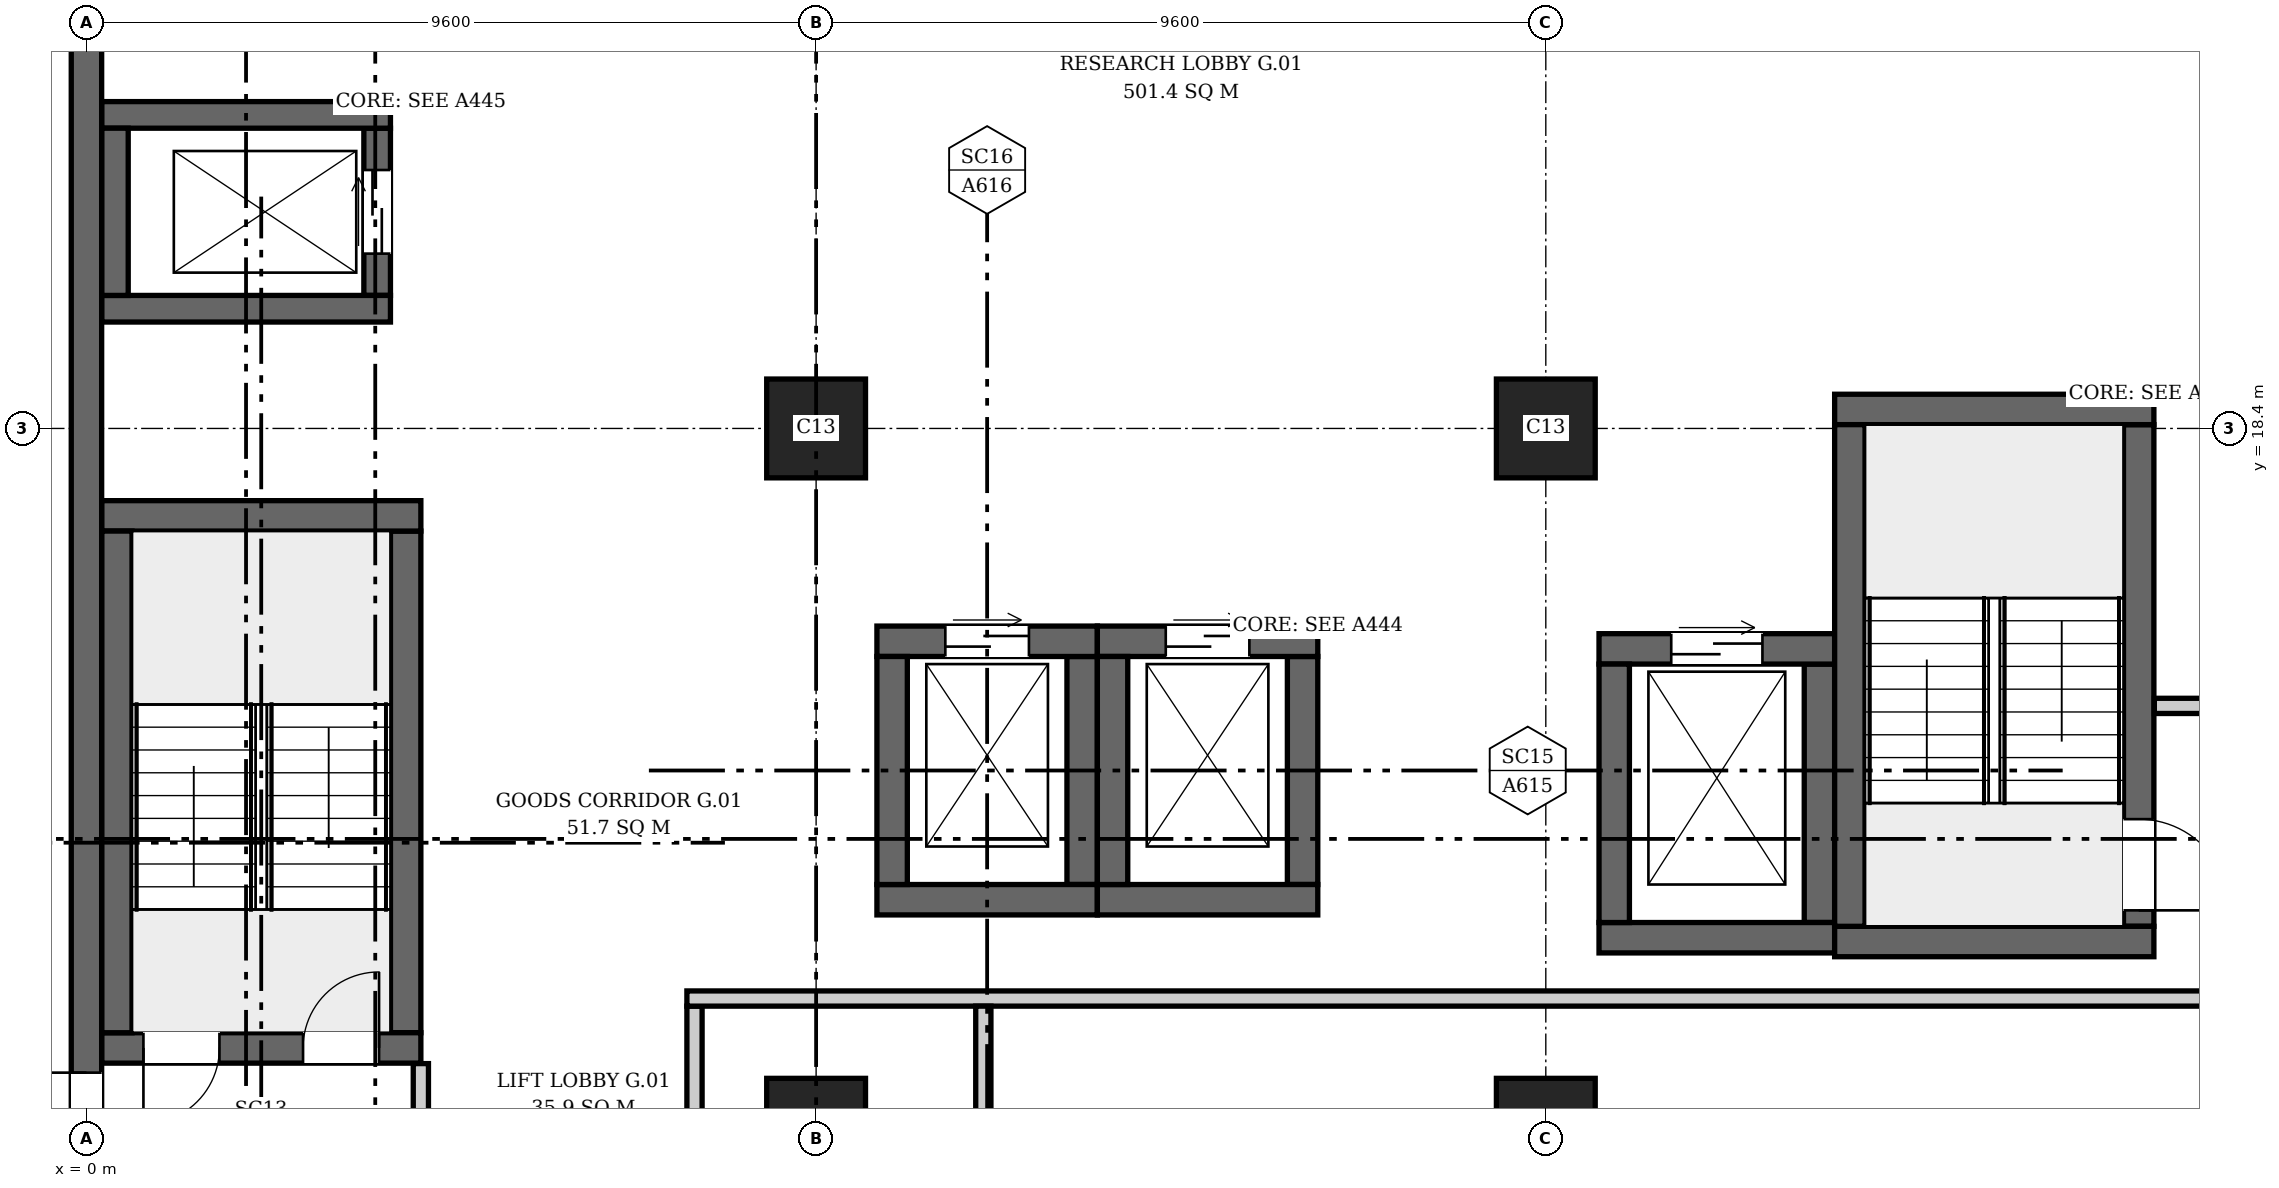
"""IFC4 building model, lengths in metres.
Left out: names, types, materials, properties, quantities, classifications, styles, units other than length and angle.
Written with IfcOpenShell. Run it as: python <this file> out.ifc"""

import sys

from ifc_helpers import new_model, si_unit, direction, frame, frame_2d, origin, origin_2d, place, context, subcontext, project, spatial, rectangle, extrude, element, fill, save


model = new_model("IFC4")
c1 = context("Model", 3, precision=1e-05, world=origin(), true_north=direction((0.0, 1.0)))
c2 = subcontext(c1, "Body", "Model", "MODEL_VIEW")
j1 = project(units=[si_unit("LENGTHUNIT", "METRE"), si_unit("PLANEANGLEUNIT", "RADIAN")], contexts=[c1])
p1 = place(None, origin())
s1 = spatial("IfcSite", under=j1, at=p1, CompositionType="ELEMENT")
p2 = place(p1, origin())
s2 = spatial("IfcBuilding", under=s1, at=p2, CompositionType="ELEMENT")
p3 = place(p2, origin())
s3 = spatial("IfcBuildingStorey", under=s2, at=p3, CompositionType="ELEMENT", Elevation=0.0)
p4 = place(p3, frame((0.0, -0.2, 0.0), z_axis=(0.0, 0.0, 1.0), x_axis=(0.0, 1.0, 0.0)))
e1 = element("IfcWall", 1, at=p4, inside=s3, PredefinedType="SHEAR", context=c2, shape_type="SweptSolid", body=[
    extrude(rectangle(XDim=46.88, YDim=0.4, at=frame_2d((23.44, 0.0))), origin(), (0.0, 0.0, 1.0), 6.5),
])
p5 = place(p4, frame((7.125, 0.0, 0.0)))
e2 = element("IfcOpeningElement", 2, at=p5, cuts=e1, PredefinedType="OPENING", context=c2, shape_type="SweptSolid", body=[
    extrude(rectangle(XDim=3.0, YDim=2.4, at=frame_2d((1.5, 1.2))), frame((0.0, 0.21, 0.0), z_axis=(0.0, -1.0, 0.0), x_axis=(1.0, 0.0, 0.0)), (0.0, 0.0, 1.0), 0.42),
])
p6 = place(p4, frame((38.2, 0.0, 0.0)))
e3 = element("IfcOpeningElement", 3, at=p6, cuts=e1, PredefinedType="OPENING", context=c2, shape_type="SweptSolid", body=[
    extrude(rectangle(XDim=3.0, YDim=2.4, at=frame_2d((1.5, 1.2))), frame((0.0, 0.21, 0.0), z_axis=(0.0, -1.0, 0.0), x_axis=(1.0, 0.0, 0.0)), (0.0, 0.0, 1.0), 0.42),
])
p7 = place(p3, frame((0.2, 10.25, 0.0), z_axis=(0.0, 0.0, 1.0), x_axis=(1.0, 0.0, 0.0)))
e4 = element("IfcWall", 4, at=p7, inside=s3, PredefinedType="SHEAR", context=c2, shape_type="SweptSolid", body=[
    extrude(rectangle(XDim=4.2, YDim=0.4, at=frame_2d((2.1, 0.0))), origin(), (0.0, 0.0, 1.0), 6.5),
])
p8 = place(p7, frame((0.55, 0.0, 0.0)))
e5 = element("IfcOpeningElement", 5, at=p8, cuts=e4, PredefinedType="OPENING", context=c2, shape_type="SweptSolid", body=[
    extrude(rectangle(XDim=1.0, YDim=2.1, at=frame_2d((0.5, 1.05))), frame((0.0, 0.21, 0.0), z_axis=(0.0, -1.0, 0.0), x_axis=(1.0, 0.0, 0.0)), (0.0, 0.0, 1.0), 0.42),
])
p9 = place(p7, frame((2.65, 0.0, 0.0)))
e6 = element("IfcOpeningElement", 6, at=p9, cuts=e4, PredefinedType="OPENING", context=c2, shape_type="SweptSolid", body=[
    extrude(rectangle(XDim=1.0, YDim=2.1, at=frame_2d((0.5, 1.05))), frame((0.0, 0.21, 0.0), z_axis=(0.0, -1.0, 0.0), x_axis=(1.0, 0.0, 0.0)), (0.0, 0.0, 1.0), 0.42),
])
p10 = place(p3, frame((0.2, 17.25, 0.0), z_axis=(0.0, 0.0, 1.0), x_axis=(1.0, 0.0, 0.0)))
e7 = element("IfcWall", 7, at=p10, inside=s3, PredefinedType="SHEAR", context=c2, shape_type="SweptSolid", body=[
    extrude(rectangle(XDim=4.2, YDim=0.4, at=frame_2d((2.1, 0.0))), origin(), (0.0, 0.0, 1.0), 6.5),
])
for number, where, z_axis, x_axis in (
    (8, (0.4, 10.45, 0.0), (0.0, 0.0, 1.0), (0.0, 1.0, 0.0)),
    (9, (4.2, 10.45, 0.0), (0.0, 0.0, 1.0), (0.0, 1.0, 0.0)),
):
    element("IfcWall", number, at=place(p3, frame(where, z_axis=z_axis, x_axis=x_axis)), inside=s3, PredefinedType="SHEAR", context=c2, shape_type="SweptSolid", body=[
        extrude(rectangle(XDim=6.6, YDim=0.4, at=frame_2d((3.3, 0.0))), origin(), (0.0, 0.0, 1.0), 6.5),
    ])
for number, where, z_axis, x_axis in (
    (10, (23.0, 11.65, 0.0), (0.0, 0.0, 1.0), (1.0, 0.0, 0.0)),
    (11, (23.0, 18.65, 0.0), (0.0, 0.0, 1.0), (1.0, 0.0, 0.0)),
):
    element("IfcWall", number, at=place(p3, frame(where, z_axis=z_axis, x_axis=x_axis)), inside=s3, PredefinedType="SHEAR", context=c2, shape_type="SweptSolid", body=[
        extrude(rectangle(XDim=4.2, YDim=0.4, at=frame_2d((2.1, 0.0))), origin(), (0.0, 0.0, 1.0), 6.5),
    ])
p11 = place(p3, frame((23.2, 11.85, 0.0), z_axis=(0.0, 0.0, 1.0), x_axis=(0.0, 1.0, 0.0)))
e12 = element("IfcWall", 12, at=p11, inside=s3, PredefinedType="SHEAR", context=c2, shape_type="SweptSolid", body=[
    extrude(rectangle(XDim=6.6, YDim=0.4, at=frame_2d((3.3, 0.0))), origin(), (0.0, 0.0, 1.0), 6.5),
])
p12 = place(p3, frame((27.0, 11.85, 0.0), z_axis=(0.0, 0.0, 1.0), x_axis=(0.0, 1.0, 0.0)))
e13 = element("IfcWall", 13, at=p12, inside=s3, PredefinedType="SHEAR", context=c2, shape_type="SweptSolid", body=[
    extrude(rectangle(XDim=6.6, YDim=0.4, at=frame_2d((3.3, 0.0))), origin(), (0.0, 0.0, 1.0), 6.5),
])
p13 = place(p12, frame((0.21, 0.0, 0.0)))
e14 = element("IfcOpeningElement", 14, at=p13, cuts=e13, PredefinedType="OPENING", context=c2, shape_type="SweptSolid", body=[
    extrude(rectangle(XDim=1.2, YDim=2.1, at=frame_2d((0.6, 1.05))), frame((0.0, 0.21, 0.0), z_axis=(0.0, -1.0, 0.0), x_axis=(1.0, 0.0, 0.0)), (0.0, 0.0, 1.0), 0.42),
])
for number, where, z_axis, x_axis in (
    (15, (0.2, 19.975, 0.0), (0.0, 0.0, 1.0), (1.0, 0.0, 0.0)),
    (16, (0.2, 22.525, 0.0), (0.0, 0.0, 1.0), (1.0, 0.0, 0.0)),
):
    element("IfcWall", number, at=place(p3, frame(where, z_axis=z_axis, x_axis=x_axis)), inside=s3, PredefinedType="SHEAR", context=c2, shape_type="SweptSolid", body=[
        extrude(rectangle(XDim=3.8, YDim=0.35, at=frame_2d((1.9, 0.0))), origin(), (0.0, 0.0, 1.0), 6.5),
    ])
p14 = place(p3, frame((0.375, 20.15, 0.0), z_axis=(0.0, 0.0, 1.0), x_axis=(0.0, 1.0, 0.0)))
e17 = element("IfcWall", 17, at=p14, inside=s3, PredefinedType="SHEAR", context=c2, shape_type="SweptSolid", body=[
    extrude(rectangle(XDim=2.2, YDim=0.35, at=frame_2d((1.1, 0.0))), origin(), (0.0, 0.0, 1.0), 6.5),
])
p15 = place(p3, frame((3.825, 20.15, 0.0), z_axis=(0.0, 0.0, 1.0), x_axis=(0.0, 1.0, 0.0)))
e18 = element("IfcWall", 18, at=p15, inside=s3, PredefinedType="SHEAR", context=c2, shape_type="SweptSolid", body=[
    extrude(rectangle(XDim=2.2, YDim=0.35, at=frame_2d((1.1, 0.0))), origin(), (0.0, 0.0, 1.0), 6.5),
])
p16 = place(p15, frame((0.55, 0.0, 0.0)))
e19 = element("IfcOpeningElement", 19, at=p16, cuts=e18, PredefinedType="OPENING", context=c2, shape_type="SweptSolid", body=[
    extrude(rectangle(XDim=1.1, YDim=2.1, at=frame_2d((0.55, 1.05))), frame((0.0, 0.185, 0.0), z_axis=(0.0, -1.0, 0.0), x_axis=(1.0, 0.0, 0.0)), (0.0, 0.0, 1.0), 0.37),
])
p17 = place(p3, frame((10.4, 12.2, 0.0), z_axis=(0.0, 0.0, 1.0), x_axis=(1.0, 0.0, 0.0)))
e20 = element("IfcWall", 20, at=p17, inside=s3, PredefinedType="SHEAR", context=c2, shape_type="SweptSolid", body=[
    extrude(rectangle(XDim=2.9, YDim=0.4, at=frame_2d((1.45, 0.0))), origin(), (0.0, 0.0, 1.0), 6.5),
])
p18 = place(p3, frame((10.4, 15.6, 0.0), z_axis=(0.0, 0.0, 1.0), x_axis=(1.0, 0.0, 0.0)))
e21 = element("IfcWall", 21, at=p18, inside=s3, PredefinedType="SHEAR", context=c2, shape_type="SweptSolid", body=[
    extrude(rectangle(XDim=2.9, YDim=0.4, at=frame_2d((1.45, 0.0))), origin(), (0.0, 0.0, 1.0), 6.5),
])
p19 = place(p18, frame((0.9, 0.0, 0.0)))
e22 = element("IfcOpeningElement", 22, at=p19, cuts=e21, PredefinedType="OPENING", context=c2, shape_type="SweptSolid", body=[
    extrude(rectangle(XDim=1.1, YDim=2.1, at=frame_2d((0.55, 1.05))), frame((0.0, 0.21, 0.0), z_axis=(0.0, -1.0, 0.0), x_axis=(1.0, 0.0, 0.0)), (0.0, 0.0, 1.0), 0.42),
])
for number, where, z_axis, x_axis in (
    (23, (10.6, 12.4, 0.0), (0.0, 0.0, 1.0), (0.0, 1.0, 0.0)),
    (24, (13.1, 12.4, 0.0), (0.0, 0.0, 1.0), (0.0, 1.0, 0.0)),
):
    element("IfcWall", number, at=place(p3, frame(where, z_axis=z_axis, x_axis=x_axis)), inside=s3, PredefinedType="SHEAR", context=c2, shape_type="SweptSolid", body=[
        extrude(rectangle(XDim=3.0, YDim=0.4, at=frame_2d((1.5, 0.0))), origin(), (0.0, 0.0, 1.0), 6.5),
    ])
p20 = place(p3, frame((13.3, 12.2, 0.0), z_axis=(0.0, 0.0, 1.0), x_axis=(1.0, 0.0, 0.0)))
e25 = element("IfcWall", 25, at=p20, inside=s3, PredefinedType="SHEAR", context=c2, shape_type="SweptSolid", body=[
    extrude(rectangle(XDim=2.9, YDim=0.4, at=frame_2d((1.45, 0.0))), origin(), (0.0, 0.0, 1.0), 6.5),
])
p21 = place(p3, frame((13.3, 15.6, 0.0), z_axis=(0.0, 0.0, 1.0), x_axis=(1.0, 0.0, 0.0)))
e26 = element("IfcWall", 26, at=p21, inside=s3, PredefinedType="SHEAR", context=c2, shape_type="SweptSolid", body=[
    extrude(rectangle(XDim=2.9, YDim=0.4, at=frame_2d((1.45, 0.0))), origin(), (0.0, 0.0, 1.0), 6.5),
])
p22 = place(p21, frame((0.9, 0.0, 0.0)))
e27 = element("IfcOpeningElement", 27, at=p22, cuts=e26, PredefinedType="OPENING", context=c2, shape_type="SweptSolid", body=[
    extrude(rectangle(XDim=1.1, YDim=2.1, at=frame_2d((0.55, 1.05))), frame((0.0, 0.21, 0.0), z_axis=(0.0, -1.0, 0.0), x_axis=(1.0, 0.0, 0.0)), (0.0, 0.0, 1.0), 0.42),
])
for number, where, z_axis, x_axis in (
    (28, (13.5, 12.4, 0.0), (0.0, 0.0, 1.0), (0.0, 1.0, 0.0)),
    (29, (16.0, 12.4, 0.0), (0.0, 0.0, 1.0), (0.0, 1.0, 0.0)),
):
    element("IfcWall", number, at=place(p3, frame(where, z_axis=z_axis, x_axis=x_axis)), inside=s3, PredefinedType="SHEAR", context=c2, shape_type="SweptSolid", body=[
        extrude(rectangle(XDim=3.0, YDim=0.4, at=frame_2d((1.5, 0.0))), origin(), (0.0, 0.0, 1.0), 6.5),
    ])
p23 = place(p3, frame((19.9, 11.7, 0.0), z_axis=(0.0, 0.0, 1.0), x_axis=(1.0, 0.0, 0.0)))
e30 = element("IfcWall", 30, at=p23, inside=s3, PredefinedType="SHEAR", context=c2, shape_type="SweptSolid", body=[
    extrude(rectangle(XDim=3.1, YDim=0.4, at=frame_2d((1.55, 0.0))), origin(), (0.0, 0.0, 1.0), 6.5),
])
p24 = place(p3, frame((19.9, 15.5, 0.0), z_axis=(0.0, 0.0, 1.0), x_axis=(1.0, 0.0, 0.0)))
e31 = element("IfcWall", 31, at=p24, inside=s3, PredefinedType="SHEAR", context=c2, shape_type="SweptSolid", body=[
    extrude(rectangle(XDim=3.1, YDim=0.4, at=frame_2d((1.55, 0.0))), origin(), (0.0, 0.0, 1.0), 6.5),
])
p25 = place(p24, frame((0.95, 0.0, 0.0)))
e32 = element("IfcOpeningElement", 32, at=p25, cuts=e31, PredefinedType="OPENING", context=c2, shape_type="SweptSolid", body=[
    extrude(rectangle(XDim=1.2, YDim=2.1, at=frame_2d((0.6, 1.05))), frame((0.0, 0.21, 0.0), z_axis=(0.0, -1.0, 0.0), x_axis=(1.0, 0.0, 0.0)), (0.0, 0.0, 1.0), 0.42),
])
for number, where, z_axis, x_axis in (
    (33, (20.1, 11.9, 0.0), (0.0, 0.0, 1.0), (0.0, 1.0, 0.0)),
    (34, (22.8, 11.9, 0.0), (0.0, 0.0, 1.0), (0.0, 1.0, 0.0)),
):
    element("IfcWall", number, at=place(p3, frame(where, z_axis=z_axis, x_axis=x_axis)), inside=s3, PredefinedType="SHEAR", context=c2, shape_type="SweptSolid", body=[
        extrude(rectangle(XDim=3.4, YDim=0.4, at=frame_2d((1.7, 0.0))), origin(), (0.0, 0.0, 1.0), 6.5),
    ])
for number, where, z_axis, x_axis in (
    (35, (9.6, 9.2, 0.0), (0.0, 0.0, 1.0), (1.0, 0.0, 0.0)),
    (36, (19.2, 9.2, 0.0), (0.0, 0.0, 1.0), (1.0, 0.0, 0.0)),
    (37, (9.6, 18.4, 0.0), (0.0, 0.0, 1.0), (1.0, 0.0, 0.0)),
    (38, (19.2, 18.4, 0.0), (0.0, 0.0, 1.0), (1.0, 0.0, 0.0)),
):
    element("IfcColumn", number, at=place(p3, frame(where, z_axis=z_axis, x_axis=x_axis)), inside=s3, PredefinedType="COLUMN", context=c2, shape_type="SweptSolid", body=[
        extrude(rectangle(XDim=1.3, YDim=1.3, at=origin_2d()), origin(), (0.0, 0.0, 1.0), 6.5),
    ])
p26 = place(p3, frame((4.4, 6.6, 0.0), z_axis=(0.0, 0.0, 1.0), x_axis=(0.0, 1.0, 0.0)))
e39 = element("IfcWall", 39, at=p26, inside=s3, PredefinedType="PARTITIONING", context=c2, shape_type="SweptSolid", body=[
    extrude(rectangle(XDim=3.444, YDim=0.2, at=frame_2d((1.722, 0.0))), origin(), (0.0, 0.0, 1.0), 6.15),
])
p27 = place(p26, frame((1.222, 0.0, 0.0)))
e40 = element("IfcOpeningElement", 40, at=p27, cuts=e39, PredefinedType="OPENING", context=c2, shape_type="SweptSolid", body=[
    extrude(rectangle(XDim=1.0, YDim=2.1, at=frame_2d((0.5, 1.05))), frame((0.0, 0.11, 0.0), z_axis=(0.0, -1.0, 0.0), x_axis=(1.0, 0.0, 0.0)), (0.0, 0.0, 1.0), 0.22),
])
p28 = place(p3, frame((8.0, 0.206, 0.0), z_axis=(0.0, 0.0, 1.0), x_axis=(0.0, 1.0, 0.0)))
e41 = element("IfcWall", 41, at=p28, inside=s3, PredefinedType="PARTITIONING", context=c2, shape_type="SweptSolid", body=[
    extrude(rectangle(XDim=10.594, YDim=0.2, at=frame_2d((5.297, 0.0))), origin(), (0.0, 0.0, 1.0), 6.15),
])
p29 = place(p28, frame((4.697, 0.0, 0.0)))
e42 = element("IfcOpeningElement", 42, at=p29, cuts=e41, PredefinedType="OPENING", context=c2, shape_type="SweptSolid", body=[
    extrude(rectangle(XDim=1.2, YDim=2.1, at=frame_2d((0.6, 1.05))), frame((0.0, 0.11, 0.0), z_axis=(0.0, -1.0, 0.0), x_axis=(1.0, 0.0, 0.0)), (0.0, 0.0, 1.0), 0.22),
])
p30 = place(p3, frame((7.9, 10.9, 0.0), z_axis=(0.0, 0.0, 1.0), x_axis=(1.0, 0.0, 0.0)))
e43 = element("IfcWall", 43, at=p30, inside=s3, PredefinedType="PARTITIONING", context=c2, shape_type="SweptSolid", body=[
    extrude(rectangle(XDim=49.494, YDim=0.2, at=frame_2d((24.747, 0.0))), origin(), (0.0, 0.0, 1.0), 6.15),
])
p31 = place(p30, frame((41.3, 0.0, 0.0)))
e44 = element("IfcOpeningElement", 44, at=p31, cuts=e43, PredefinedType="OPENING", context=c2, shape_type="SweptSolid", body=[
    extrude(rectangle(XDim=1.2, YDim=2.1, at=frame_2d((0.6, 1.05))), frame((0.0, 0.11, 0.0), z_axis=(0.0, -1.0, 0.0), x_axis=(1.0, 0.0, 0.0)), (0.0, 0.0, 1.0), 0.22),
])
p32 = place(p3, frame((11.8, 0.206, 0.0), z_axis=(0.0, 0.0, 1.0), x_axis=(0.0, 1.0, 0.0)))
e45 = element("IfcWall", 45, at=p32, inside=s3, PredefinedType="PARTITIONING", context=c2, shape_type="SweptSolid", body=[
    extrude(rectangle(XDim=10.594, YDim=0.2, at=frame_2d((5.297, 0.0))), origin(), (0.0, 0.0, 1.0), 6.15),
])
p33 = place(p32, frame((4.397, 0.0, 0.0)))
e46 = element("IfcOpeningElement", 46, at=p33, cuts=e45, PredefinedType="OPENING", context=c2, shape_type="SweptSolid", body=[
    extrude(rectangle(XDim=1.8, YDim=2.1, at=frame_2d((0.9, 1.05))), frame((0.0, 0.11, 0.0), z_axis=(0.0, -1.0, 0.0), x_axis=(1.0, 0.0, 0.0)), (0.0, 0.0, 1.0), 0.22),
])
p34 = place(p3, frame((27.206, 14.75, 0.0), z_axis=(0.0, 0.0, 1.0), x_axis=(1.0, 0.0, 0.0)))
e47 = element("IfcWall", 47, at=p34, inside=s3, PredefinedType="PARTITIONING", context=c2, shape_type="SweptSolid", body=[
    extrude(rectangle(XDim=30.188, YDim=0.2, at=frame_2d((15.094, 0.0))), origin(), (0.0, 0.0, 1.0), 6.15),
])
p35 = place(p5, origin())
e48 = element("IfcDoor", 48, at=p35, inside=s3, OperationType="DOUBLE_DOOR_SINGLE_SWING", PredefinedType="DOOR", context=c2, shape_type="SweptSolid", body=[
    extrude(rectangle(XDim=3.0, YDim=2.4, at=frame_2d((1.5, 1.2))), frame((0.0, 0.025, 0.0), z_axis=(0.0, -1.0, 0.0), x_axis=(1.0, 0.0, 0.0)), (0.0, 0.0, 1.0), 0.05),
])
fill(e2, e48)
p36 = place(p8, origin())
e49 = element("IfcDoor", 49, at=p36, inside=s3, OperationType="SINGLE_SWING_LEFT", PredefinedType="DOOR", context=c2, shape_type="SweptSolid", body=[
    extrude(rectangle(XDim=1.0, YDim=2.1, at=frame_2d((0.5, 1.05))), frame((0.0, 0.025, 0.0), z_axis=(0.0, -1.0, 0.0), x_axis=(1.0, 0.0, 0.0)), (0.0, 0.0, 1.0), 0.05),
])
fill(e5, e49)
p37 = place(p9, origin())
e50 = element("IfcDoor", 50, at=p37, inside=s3, OperationType="SINGLE_SWING_RIGHT", PredefinedType="DOOR", context=c2, shape_type="SweptSolid", body=[
    extrude(rectangle(XDim=1.0, YDim=2.1, at=frame_2d((0.5, 1.05))), frame((0.0, 0.025, 0.0), z_axis=(0.0, -1.0, 0.0), x_axis=(1.0, 0.0, 0.0)), (0.0, 0.0, 1.0), 0.05),
])
fill(e6, e50)
p38 = place(p13, origin())
e51 = element("IfcDoor", 51, at=p38, inside=s3, OperationType="SINGLE_SWING_LEFT", PredefinedType="DOOR", context=c2, shape_type="SweptSolid", body=[
    extrude(rectangle(XDim=1.2, YDim=2.1, at=frame_2d((0.6, 1.05))), frame((0.0, 0.025, 0.0), z_axis=(0.0, -1.0, 0.0), x_axis=(1.0, 0.0, 0.0)), (0.0, 0.0, 1.0), 0.05),
])
fill(e14, e51)
p39 = place(p16, origin())
e52 = element("IfcDoor", 52, at=p39, inside=s3, OperationType="DOUBLE_DOOR_SLIDING", PredefinedType="DOOR", context=c2, shape_type="SweptSolid", body=[
    extrude(rectangle(XDim=1.1, YDim=2.1, at=frame_2d((0.55, 1.05))), frame((0.0, 0.025, 0.0), z_axis=(0.0, -1.0, 0.0), x_axis=(1.0, 0.0, 0.0)), (0.0, 0.0, 1.0), 0.05),
])
fill(e19, e52)
p40 = place(p19, origin())
e53 = element("IfcDoor", 53, at=p40, inside=s3, OperationType="DOUBLE_DOOR_SLIDING", PredefinedType="DOOR", context=c2, shape_type="SweptSolid", body=[
    extrude(rectangle(XDim=1.1, YDim=2.1, at=frame_2d((0.55, 1.05))), frame((0.0, 0.025, 0.0), z_axis=(0.0, -1.0, 0.0), x_axis=(1.0, 0.0, 0.0)), (0.0, 0.0, 1.0), 0.05),
])
fill(e22, e53)
p41 = place(p22, origin())
e54 = element("IfcDoor", 54, at=p41, inside=s3, OperationType="DOUBLE_DOOR_SLIDING", PredefinedType="DOOR", context=c2, shape_type="SweptSolid", body=[
    extrude(rectangle(XDim=1.1, YDim=2.1, at=frame_2d((0.55, 1.05))), frame((0.0, 0.025, 0.0), z_axis=(0.0, -1.0, 0.0), x_axis=(1.0, 0.0, 0.0)), (0.0, 0.0, 1.0), 0.05),
])
fill(e27, e54)
p42 = place(p25, origin())
e55 = element("IfcDoor", 55, at=p42, inside=s3, OperationType="DOUBLE_DOOR_SLIDING", PredefinedType="DOOR", context=c2, shape_type="SweptSolid", body=[
    extrude(rectangle(XDim=1.2, YDim=2.1, at=frame_2d((0.6, 1.05))), frame((0.0, 0.025, 0.0), z_axis=(0.0, -1.0, 0.0), x_axis=(1.0, 0.0, 0.0)), (0.0, 0.0, 1.0), 0.05),
])
fill(e32, e55)
save(model, sys.argv[1])
